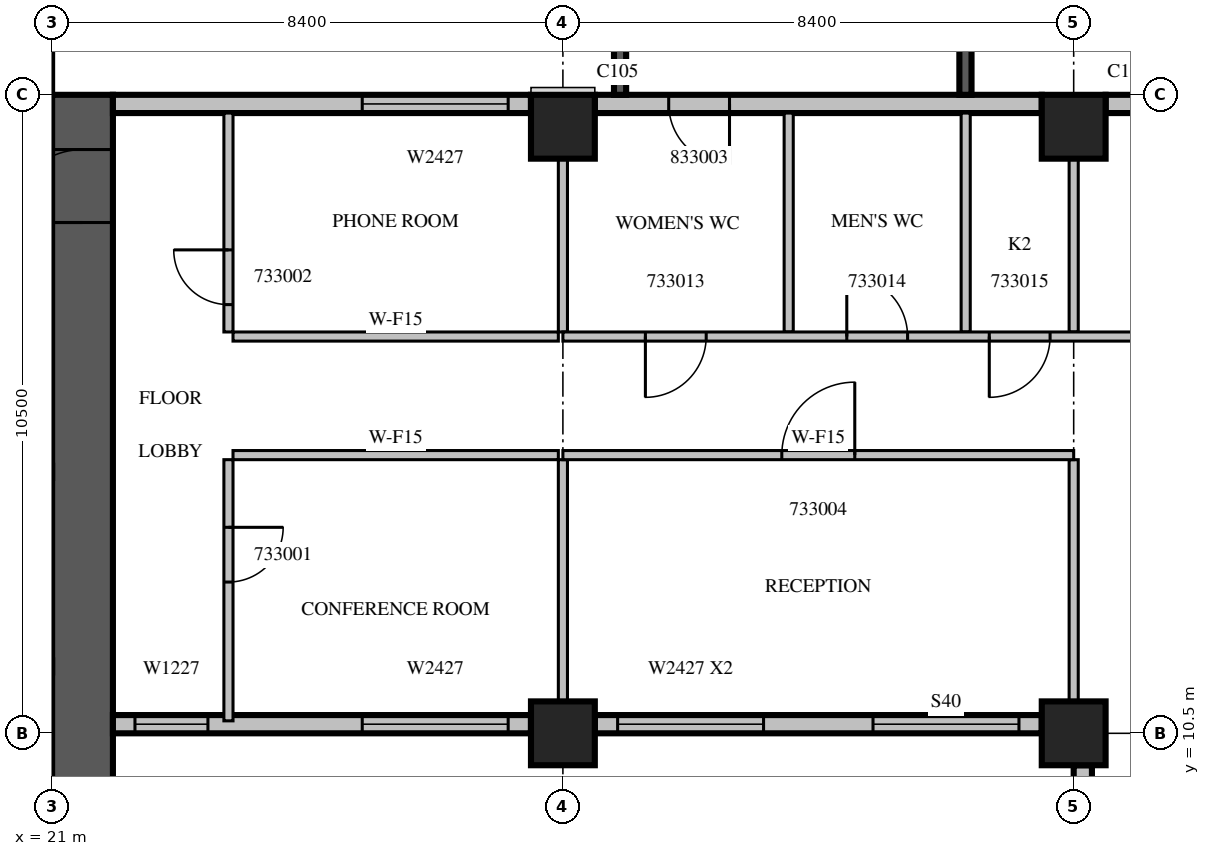
"""IFC4 building model, lengths in metres.
Left out: names, types, materials, properties, quantities, classifications, styles, units other than length and angle.
Written with IfcOpenShell. Run it as: python <this file> out.ifc"""

import sys

from ifc_helpers import new_model, si_unit, direction, frame, frame_2d, origin, origin_2d, place, context, subcontext, project, spatial, rectangle, extrude, source, transform, mapped, element, fill, save


model = new_model("IFC4")
c1 = context("Model", 3, precision=1e-05, world=origin(), true_north=direction((0.0, 1.0)))
c2 = subcontext(c1, "Body", "Model", "MODEL_VIEW")
j1 = project(units=[si_unit("LENGTHUNIT", "METRE"), si_unit("PLANEANGLEUNIT", "RADIAN")], contexts=[c1])
p1 = place(None, origin())
s1 = spatial("IfcSite", under=j1, at=p1, CompositionType="ELEMENT")
p2 = place(p1, origin())
s2 = spatial("IfcBuilding", under=s1, at=p2, CompositionType="ELEMENT")
p3 = place(p2, frame((0.0, 0.0, 149.7)))
s3 = spatial("IfcBuildingStorey", under=s2, at=p3, CompositionType="ELEMENT", Elevation=149.7)
m1 = source(origin(), c2, "Body", "SweptSolid", [
    extrude(rectangle(XDim=1.05, YDim=1.05, at=origin_2d()), origin(), (0.0, 0.0, 1.0), 4.2),
])
for number, where, z_axis, x_axis in (
    (1, (29.4, 10.5, 0.0), (0.0, 0.0, 1.0), (1.0, 0.0, 0.0)),
    (2, (37.8, 10.5, 0.0), (0.0, 0.0, 1.0), (1.0, 0.0, 0.0)),
    (3, (29.4, 20.475, 0.0), (0.0, 0.0, 1.0), (1.0, 0.0, 0.0)),
    (4, (37.8, 20.475, 0.0), (0.0, 0.0, 1.0), (1.0, 0.0, 0.0)),
):
    element("IfcColumn", number, at=place(p3, frame(where, z_axis=z_axis, x_axis=x_axis)), inside=s3, PredefinedType="COLUMN", context=c2, shape_type="MappedRepresentation", body=[
        mapped(m1, transform((0.0, 0.0, 0.0), scale=1.0)),
    ])
m2 = source(origin(), c2, "Body", "SweptSolid", [
    extrude(rectangle(XDim=16.8, YDim=1.0, at=frame_2d((8.4, 0.0))), origin(), (0.0, 0.0, 1.0), 4.2),
])
p4 = place(p3, frame((21.5, 4.2, 0.0), z_axis=(0.0, 0.0, 1.0), x_axis=(0.0, 1.0, 0.0)))
e5 = element("IfcWall", 5, at=p4, inside=s3, PredefinedType="SHEAR", context=c2, shape_type="MappedRepresentation", body=[
    mapped(m2, transform((0.0, 0.0, 0.0), scale=1.0)),
])
m3 = source(origin(), c2, "Body", "SweptSolid", [
    extrude(rectangle(XDim=1.2, YDim=2.1, at=frame_2d((0.6, 1.05))), frame((0.0, 0.51, 0.0), z_axis=(0.0, -1.0, 0.0), x_axis=(1.0, 0.0, 0.0)), (0.0, 0.0, 1.0), 1.02),
])
p5 = place(p4, frame((14.7, 0.0, 0.0)))
e6 = element("IfcOpeningElement", 6, at=p5, cuts=e5, PredefinedType="OPENING", context=c2, shape_type="MappedRepresentation", body=[
    mapped(m3, transform((0.0, 0.0, 0.0), scale=1.0)),
])
m4 = source(origin(), c2, "Body", "SweptSolid", [
    extrude(rectangle(XDim=6.875, YDim=0.3, at=frame_2d((3.438, 0.0))), origin(), (0.0, 0.0, 1.0), 3.8),
])
p6 = place(p3, frame((22.0, 10.65, 0.0), z_axis=(0.0, 0.0, 1.0), x_axis=(1.0, 0.0, 0.0)))
e7 = element("IfcWall", 7, at=p6, inside=s3, PredefinedType="STANDARD", context=c2, shape_type="MappedRepresentation", body=[
    mapped(m4, transform((0.0, 0.0, 0.0), scale=1.0)),
])
m5 = source(origin(), c2, "Body", "SweptSolid", [
    extrude(rectangle(XDim=1.2, YDim=2.7, at=frame_2d((0.6, 1.35))), frame((0.0, 0.16, 0.0), z_axis=(0.0, -1.0, 0.0), x_axis=(1.0, 0.0, 0.0)), (0.0, 0.0, 1.0), 0.32),
])
p7 = place(p6, frame((0.362, 0.0, 0.6)))
e8 = element("IfcOpeningElement", 8, at=p7, cuts=e7, PredefinedType="OPENING", context=c2, shape_type="MappedRepresentation", body=[
    mapped(m5, transform((0.0, 0.0, 0.0), scale=1.0)),
])
m6 = source(origin(), c2, "Body", "SweptSolid", [
    extrude(rectangle(XDim=2.4, YDim=2.7, at=frame_2d((1.2, 1.35))), frame((0.0, 0.16, 0.0), z_axis=(0.0, -1.0, 0.0), x_axis=(1.0, 0.0, 0.0)), (0.0, 0.0, 1.0), 0.32),
])
p8 = place(p6, frame((4.1, 0.0, 0.6)))
e9 = element("IfcOpeningElement", 9, at=p8, cuts=e7, PredefinedType="OPENING", context=c2, shape_type="MappedRepresentation", body=[
    mapped(m6, transform((0.0, 0.0, 0.0), scale=1.0)),
])
m7 = source(origin(), c2, "Body", "SweptSolid", [
    extrude(rectangle(XDim=7.35, YDim=0.3, at=frame_2d((3.675, 0.0))), origin(), (0.0, 0.0, 1.0), 3.8),
])
p9 = place(p3, frame((29.925, 10.65, 0.0), z_axis=(0.0, 0.0, 1.0), x_axis=(1.0, 0.0, 0.0)))
e10 = element("IfcWall", 10, at=p9, inside=s3, PredefinedType="STANDARD", context=c2, shape_type="MappedRepresentation", body=[
    mapped(m7, transform((0.0, 0.0, 0.0), scale=1.0)),
])
p10 = place(p9, frame((0.375, 0.0, 0.6)))
e11 = element("IfcOpeningElement", 11, at=p10, cuts=e10, PredefinedType="OPENING", context=c2, shape_type="MappedRepresentation", body=[
    mapped(m6, transform((0.0, 0.0, 0.0), scale=1.0)),
])
p11 = place(p9, frame((4.575, 0.0, 0.6)))
e12 = element("IfcOpeningElement", 12, at=p11, cuts=e10, PredefinedType="OPENING", context=c2, shape_type="MappedRepresentation", body=[
    mapped(m6, transform((0.0, 0.0, 0.0), scale=1.0)),
])
m8 = source(origin(), c2, "Body", "SweptSolid", [
    extrude(rectangle(XDim=8.925, YDim=0.3, at=frame_2d((4.463, 0.0))), origin(), (0.0, 0.0, 1.0), 3.8),
])
p12 = place(p3, frame((37.95, 9.975, 0.0), z_axis=(0.0, 0.0, 1.0), x_axis=(0.0, -1.0, 0.0)))
e13 = element("IfcWall", 13, at=p12, inside=s3, PredefinedType="STANDARD", context=c2, shape_type="MappedRepresentation", body=[
    mapped(m8, transform((0.0, 0.0, 0.0), scale=1.0)),
])
m9 = source(origin(), c2, "Body", "SweptSolid", [
    extrude(rectangle(XDim=1.8, YDim=2.7, at=frame_2d((0.9, 1.35))), frame((0.0, 0.16, 0.0), z_axis=(0.0, -1.0, 0.0), x_axis=(1.0, 0.0, 0.0)), (0.0, 0.0, 1.0), 0.32),
])
p13 = place(p12, frame((1.887, 0.0, 0.6)))
e14 = element("IfcOpeningElement", 14, at=p13, cuts=e13, PredefinedType="OPENING", context=c2, shape_type="MappedRepresentation", body=[
    mapped(m9, transform((0.0, 0.0, 0.0), scale=1.0)),
])
p14 = place(p12, frame((6.15, 0.0, 0.6)))
e15 = element("IfcOpeningElement", 15, at=p14, cuts=e13, PredefinedType="OPENING", context=c2, shape_type="MappedRepresentation", body=[
    mapped(m6, transform((0.0, 0.0, 0.0), scale=1.0)),
])
p15 = place(p3, frame((45.675, 20.85, 0.0), z_axis=(0.0, 0.0, 1.0), x_axis=(-1.0, 0.0, 0.0)))
e16 = element("IfcWall", 16, at=p15, inside=s3, PredefinedType="STANDARD", context=c2, shape_type="MappedRepresentation", body=[
    mapped(m7, transform((0.0, 0.0, 0.0), scale=1.0)),
])
m10 = source(origin(), c2, "Body", "SweptSolid", [
    extrude(rectangle(XDim=1.0, YDim=2.1, at=frame_2d((0.5, 1.05))), frame((0.0, 0.16, 0.0), z_axis=(0.0, -1.0, 0.0), x_axis=(1.0, 0.0, 0.0)), (0.0, 0.0, 1.0), 0.32),
])
p16 = place(p15, frame((1.075, 0.0, 0.0)))
e17 = element("IfcOpeningElement", 17, at=p16, cuts=e16, PredefinedType="OPENING", context=c2, shape_type="MappedRepresentation", body=[
    mapped(m10, transform((0.0, 0.0, 0.0), scale=1.0)),
])
p17 = place(p3, frame((37.275, 20.85, 0.0), z_axis=(0.0, 0.0, 1.0), x_axis=(-1.0, 0.0, 0.0)))
e18 = element("IfcWall", 18, at=p17, inside=s3, PredefinedType="STANDARD", context=c2, shape_type="MappedRepresentation", body=[
    mapped(m7, transform((0.0, 0.0, 0.0), scale=1.0)),
])
p18 = place(p17, frame((5.135, 0.0, 0.0)))
e19 = element("IfcOpeningElement", 19, at=p18, cuts=e18, PredefinedType="OPENING", context=c2, shape_type="MappedRepresentation", body=[
    mapped(m10, transform((0.0, 0.0, 0.0), scale=1.0)),
])
p19 = place(p3, frame((28.875, 20.85, 0.0), z_axis=(0.0, 0.0, 1.0), x_axis=(-1.0, 0.0, 0.0)))
e20 = element("IfcWall", 20, at=p19, inside=s3, PredefinedType="STANDARD", context=c2, shape_type="MappedRepresentation", body=[
    mapped(m4, transform((0.0, 0.0, 0.0), scale=1.0)),
])
p20 = place(p19, frame((0.375, 0.0, 0.6)))
e21 = element("IfcOpeningElement", 21, at=p20, cuts=e20, PredefinedType="OPENING", context=c2, shape_type="MappedRepresentation", body=[
    mapped(m6, transform((0.0, 0.0, 0.0), scale=1.0)),
])
m11 = source(origin(), c2, "Body", "SweptSolid", [
    extrude(rectangle(XDim=3.9, YDim=0.2, at=frame_2d((1.95, 0.0))), origin(), (0.0, 0.0, 1.0), 3.79),
])
p21 = place(p3, frame((36.02, 21.0, 0.0), z_axis=(0.0, 0.0, 1.0), x_axis=(0.0, 1.0, 0.0)))
e22 = element("IfcWall", 22, at=p21, inside=s3, PredefinedType="SOLIDWALL", context=c2, shape_type="MappedRepresentation", body=[
    mapped(m11, transform((0.0, 0.0, 0.0), scale=1.0)),
])
m12 = source(origin(), c2, "Body", "SweptSolid", [
    extrude(rectangle(XDim=2.4, YDim=2.7, at=frame_2d((1.2, 1.35))), frame((0.0, 0.11, 0.0), z_axis=(0.0, -1.0, 0.0), x_axis=(1.0, 0.0, 0.0)), (0.0, 0.0, 1.0), 0.22),
])
p22 = place(p21, frame((0.75, 0.0, 0.6)))
e23 = element("IfcOpeningElement", 23, at=p22, cuts=e22, PredefinedType="OPENING", context=c2, shape_type="MappedRepresentation", body=[
    mapped(m12, transform((0.0, 0.0, 0.0), scale=1.0)),
])
p23 = place(p3, frame((30.34, 21.0, 0.0), z_axis=(0.0, 0.0, 1.0), x_axis=(0.0, 1.0, 0.0)))
e24 = element("IfcWall", 24, at=p23, inside=s3, PredefinedType="SOLIDWALL", context=c2, shape_type="MappedRepresentation", body=[
    mapped(m11, transform((0.0, 0.0, 0.0), scale=1.0)),
])
p24 = place(p23, frame((0.75, 0.0, 0.6)))
e25 = element("IfcOpeningElement", 25, at=p24, cuts=e24, PredefinedType="OPENING", context=c2, shape_type="MappedRepresentation", body=[
    mapped(m12, transform((0.0, 0.0, 0.0), scale=1.0)),
])
m13 = source(origin(), c2, "Body", "SweptSolid", [
    extrude(rectangle(XDim=4.295, YDim=0.15, at=frame_2d((2.147, 0.0))), origin(), (0.0, 0.0, 1.0), 3.8),
])
p25 = place(p3, frame((23.9, 15.0, 0.0), z_axis=(0.0, 0.0, 1.0), x_axis=(0.0, -1.0, 0.0)))
e26 = element("IfcWall", 26, at=p25, inside=s3, PredefinedType="PARTITIONING", context=c2, shape_type="MappedRepresentation", body=[
    mapped(m13, transform((0.0, 0.0, 0.0), scale=1.0)),
])
m14 = source(origin(), c2, "Body", "SweptSolid", [
    extrude(rectangle(XDim=0.9, YDim=2.1, at=frame_2d((0.45, 1.05))), frame((0.0, 0.085, 0.0), z_axis=(0.0, -1.0, 0.0), x_axis=(1.0, 0.0, 0.0)), (0.0, 0.0, 1.0), 0.17),
])
p26 = place(p25, frame((1.113, 0.0, 0.0)))
e27 = element("IfcOpeningElement", 27, at=p26, cuts=e26, PredefinedType="OPENING", context=c2, shape_type="MappedRepresentation", body=[
    mapped(m14, transform((0.0, 0.0, 0.0), scale=1.0)),
])
m15 = source(origin(), c2, "Body", "SweptSolid", [
    extrude(rectangle(XDim=3.6, YDim=0.15, at=frame_2d((1.8, 0.0))), origin(), (0.0, 0.0, 1.0), 3.8),
])
p27 = place(p3, frame((23.9, 20.7, 0.0), z_axis=(0.0, 0.0, 1.0), x_axis=(0.0, -1.0, 0.0)))
e28 = element("IfcWall", 28, at=p27, inside=s3, PredefinedType="PARTITIONING", context=c2, shape_type="MappedRepresentation", body=[
    mapped(m15, transform((0.0, 0.0, 0.0), scale=1.0)),
])
p28 = place(p27, frame((2.25, 0.0, 0.0)))
e29 = element("IfcOpeningElement", 29, at=p28, cuts=e28, PredefinedType="OPENING", context=c2, shape_type="MappedRepresentation", body=[
    mapped(m14, transform((0.0, 0.0, 0.0), scale=1.0)),
])
m16 = source(origin(), c2, "Body", "SweptSolid", [
    extrude(rectangle(XDim=5.35, YDim=0.15, at=frame_2d((2.675, 0.0))), origin(), (0.0, 0.0, 1.0), 3.8),
])
for number, where, z_axis, x_axis in (
    (30, (29.325, 15.075, 0.0), (0.0, 0.0, 1.0), (-1.0, 0.0, 0.0)),
    (31, (23.975, 17.025, 0.0), (0.0, 0.0, 1.0), (1.0, 0.0, 0.0)),
):
    element("IfcWall", number, at=place(p3, frame(where, z_axis=z_axis, x_axis=x_axis)), inside=s3, PredefinedType="PARTITIONING", context=c2, shape_type="MappedRepresentation", body=[
        mapped(m16, transform((0.0, 0.0, 0.0), scale=1.0)),
    ])
m17 = source(origin(), c2, "Body", "SweptSolid", [
    extrude(rectangle(XDim=3.976, YDim=0.15, at=frame_2d((1.988, 0.0))), origin(), (0.0, 0.0, 1.0), 3.8),
])
p29 = place(p3, frame((29.4, 11.024, 0.0), z_axis=(0.0, 0.0, 1.0), x_axis=(0.0, 1.0, 0.0)))
e32 = element("IfcWall", 32, at=p29, inside=s3, PredefinedType="PARTITIONING", context=c2, shape_type="MappedRepresentation", body=[
    mapped(m17, transform((0.0, 0.0, 0.0), scale=1.0)),
])
m18 = source(origin(), c2, "Body", "SweptSolid", [
    extrude(rectangle(XDim=2.851, YDim=0.15, at=frame_2d((1.425, 0.0))), origin(), (0.0, 0.0, 1.0), 3.8),
])
p30 = place(p3, frame((29.4, 17.1, 0.0), z_axis=(0.0, 0.0, 1.0), x_axis=(0.0, 1.0, 0.0)))
e33 = element("IfcWall", 33, at=p30, inside=s3, PredefinedType="PARTITIONING", context=c2, shape_type="MappedRepresentation", body=[
    mapped(m18, transform((0.0, 0.0, 0.0), scale=1.0)),
])
p31 = place(p3, frame((37.8, 11.024, 0.0), z_axis=(0.0, 0.0, 1.0), x_axis=(0.0, 1.0, 0.0)))
e34 = element("IfcWall", 34, at=p31, inside=s3, PredefinedType="PARTITIONING", context=c2, shape_type="MappedRepresentation", body=[
    mapped(m17, transform((0.0, 0.0, 0.0), scale=1.0)),
])
for number, where, z_axis, x_axis in (
    (35, (33.113, 20.7, 0.0), (0.0, 0.0, 1.0), (0.0, -1.0, 0.0)),
    (36, (36.024, 20.7, 0.0), (0.0, 0.0, 1.0), (0.0, -1.0, 0.0)),
):
    element("IfcWall", number, at=place(p3, frame(where, z_axis=z_axis, x_axis=x_axis)), inside=s3, PredefinedType="PARTITIONING", context=c2, shape_type="MappedRepresentation", body=[
        mapped(m15, transform((0.0, 0.0, 0.0), scale=1.0)),
    ])
p32 = place(p3, frame((37.8, 17.1, 0.0), z_axis=(0.0, 0.0, 1.0), x_axis=(0.0, 1.0, 0.0)))
e37 = element("IfcWall", 37, at=p32, inside=s3, PredefinedType="PARTITIONING", context=c2, shape_type="MappedRepresentation", body=[
    mapped(m18, transform((0.0, 0.0, 0.0), scale=1.0)),
])
m19 = source(origin(), c2, "Body", "SweptSolid", [
    extrude(rectangle(XDim=8.4, YDim=0.15, at=frame_2d((4.2, 0.0))), origin(), (0.0, 0.0, 1.0), 3.8),
])
p33 = place(p3, frame((37.8, 15.075, 0.0), z_axis=(0.0, 0.0, 1.0), x_axis=(-1.0, 0.0, 0.0)))
e38 = element("IfcWall", 38, at=p33, inside=s3, PredefinedType="PARTITIONING", context=c2, shape_type="MappedRepresentation", body=[
    mapped(m19, transform((0.0, 0.0, 0.0), scale=1.0)),
])
m20 = source(origin(), c2, "Body", "SweptSolid", [
    extrude(rectangle(XDim=1.2, YDim=2.1, at=frame_2d((0.6, 1.05))), frame((0.0, 0.085, 0.0), z_axis=(0.0, -1.0, 0.0), x_axis=(1.0, 0.0, 0.0)), (0.0, 0.0, 1.0), 0.17),
])
p34 = place(p33, frame((3.6, 0.0, 0.0)))
e39 = element("IfcOpeningElement", 39, at=p34, cuts=e38, PredefinedType="OPENING", context=c2, shape_type="MappedRepresentation", body=[
    mapped(m20, transform((0.0, 0.0, 0.0), scale=1.0)),
])
m21 = source(origin(), c2, "Body", "SweptSolid", [
    extrude(rectangle(XDim=37.5, YDim=0.15, at=frame_2d((18.75, 0.0))), origin(), (0.0, 0.0, 1.0), 3.8),
])
p35 = place(p3, frame((29.4, 17.025, 0.0), z_axis=(0.0, 0.0, 1.0), x_axis=(1.0, 0.0, 0.0)))
e40 = element("IfcWall", 40, at=p35, inside=s3, PredefinedType="PARTITIONING", context=c2, shape_type="MappedRepresentation", body=[
    mapped(m21, transform((0.0, 0.0, 0.0), scale=1.0)),
])
m22 = source(origin(), c2, "Body", "SweptSolid", [
    extrude(rectangle(XDim=1.0, YDim=2.1, at=frame_2d((0.5, 1.05))), frame((0.0, 0.085, 0.0), z_axis=(0.0, -1.0, 0.0), x_axis=(1.0, 0.0, 0.0)), (0.0, 0.0, 1.0), 0.17),
])
p36 = place(p35, frame((1.357, 0.0, 0.0)))
e41 = element("IfcOpeningElement", 41, at=p36, cuts=e40, PredefinedType="OPENING", context=c2, shape_type="MappedRepresentation", body=[
    mapped(m22, transform((0.0, 0.0, 0.0), scale=1.0)),
])
p37 = place(p35, frame((4.669, 0.0, 0.0)))
e42 = element("IfcOpeningElement", 42, at=p37, cuts=e40, PredefinedType="OPENING", context=c2, shape_type="MappedRepresentation", body=[
    mapped(m22, transform((0.0, 0.0, 0.0), scale=1.0)),
])
p38 = place(p35, frame((7.012, 0.0, 0.0)))
e43 = element("IfcOpeningElement", 43, at=p38, cuts=e40, PredefinedType="OPENING", context=c2, shape_type="MappedRepresentation", body=[
    mapped(m22, transform((0.0, 0.0, 0.0), scale=1.0)),
])
p39 = place(p35, frame((10.05, 0.0, 0.0)))
e44 = element("IfcOpeningElement", 44, at=p39, cuts=e40, PredefinedType="OPENING", context=c2, shape_type="MappedRepresentation", body=[
    mapped(m14, transform((0.0, 0.0, 0.0), scale=1.0)),
])
p40 = place(p35, frame((14.62, 0.0, 0.0)))
e45 = element("IfcOpeningElement", 45, at=p40, cuts=e40, PredefinedType="OPENING", context=c2, shape_type="MappedRepresentation", body=[
    mapped(m22, transform((0.0, 0.0, 0.0), scale=1.0)),
])
p41 = place(p35, frame((19.66, 0.0, 0.0)))
e46 = element("IfcOpeningElement", 46, at=p41, cuts=e40, PredefinedType="OPENING", context=c2, shape_type="MappedRepresentation", body=[
    mapped(m22, transform((0.0, 0.0, 0.0), scale=1.0)),
])
p42 = place(p35, frame((25.804, 0.0, 0.0)))
e47 = element("IfcOpeningElement", 47, at=p42, cuts=e40, PredefinedType="OPENING", context=c2, shape_type="MappedRepresentation", body=[
    mapped(m20, transform((0.0, 0.0, 0.0), scale=1.0)),
])
p43 = place(p35, frame((33.251, 0.0, 0.0)))
e48 = element("IfcOpeningElement", 48, at=p43, cuts=e40, PredefinedType="OPENING", context=c2, shape_type="MappedRepresentation", body=[
    mapped(m20, transform((0.0, 0.0, 0.0), scale=1.0)),
])
m23 = source(origin(), c2, "Body", "SweptSolid", [
    extrude(rectangle(XDim=1.2, YDim=2.7, at=frame_2d((0.6, 1.35))), frame((0.0, 0.03, 0.0), z_axis=(0.0, -1.0, 0.0), x_axis=(1.0, 0.0, 0.0)), (0.0, 0.0, 1.0), 0.06),
])
p44 = place(p7, origin())
e49 = element("IfcWindow", 49, at=p44, inside=s3, PartitioningType="SINGLE_PANEL", PredefinedType="WINDOW", context=c2, shape_type="MappedRepresentation", body=[
    mapped(m23, transform((0.0, 0.0, 0.0), scale=1.0)),
])
fill(e8, e49)
m24 = source(origin(), c2, "Body", "SweptSolid", [
    extrude(rectangle(XDim=2.4, YDim=2.7, at=frame_2d((1.2, 1.35))), frame((0.0, 0.03, 0.0), z_axis=(0.0, -1.0, 0.0), x_axis=(1.0, 0.0, 0.0)), (0.0, 0.0, 1.0), 0.06),
])
p45 = place(p8, origin())
e50 = element("IfcWindow", 50, at=p45, inside=s3, PartitioningType="SINGLE_PANEL", PredefinedType="WINDOW", context=c2, shape_type="MappedRepresentation", body=[
    mapped(m24, transform((0.0, 0.0, 0.0), scale=1.0)),
])
fill(e9, e50)
p46 = place(p10, origin())
e51 = element("IfcWindow", 51, at=p46, inside=s3, PartitioningType="SINGLE_PANEL", PredefinedType="WINDOW", context=c2, shape_type="MappedRepresentation", body=[
    mapped(m24, transform((0.0, 0.0, 0.0), scale=1.0)),
])
fill(e11, e51)
p47 = place(p11, origin())
e52 = element("IfcWindow", 52, at=p47, inside=s3, PartitioningType="SINGLE_PANEL", PredefinedType="WINDOW", context=c2, shape_type="MappedRepresentation", body=[
    mapped(m24, transform((0.0, 0.0, 0.0), scale=1.0)),
])
fill(e12, e52)
p48 = place(p20, origin())
e53 = element("IfcWindow", 53, at=p48, inside=s3, PartitioningType="SINGLE_PANEL", PredefinedType="WINDOW", context=c2, shape_type="MappedRepresentation", body=[
    mapped(m24, transform((0.0, 0.0, 0.0), scale=1.0)),
])
fill(e21, e53)
m25 = source(origin(), c2, "Body", "SweptSolid", [
    extrude(rectangle(XDim=1.2, YDim=2.1, at=frame_2d((0.6, 1.05))), frame((0.0, 0.025, 0.0), z_axis=(0.0, -1.0, 0.0), x_axis=(1.0, 0.0, 0.0)), (0.0, 0.0, 1.0), 0.05),
])
p49 = place(p5, origin())
e54 = element("IfcDoor", 54, at=p49, inside=s3, OperationType="SINGLE_SWING_LEFT", PredefinedType="DOOR", context=c2, shape_type="MappedRepresentation", body=[
    mapped(m25, transform((0.0, 0.0, 0.0), scale=1.0)),
])
fill(e6, e54)
m26 = source(origin(), c2, "Body", "SweptSolid", [
    extrude(rectangle(XDim=0.9, YDim=2.1, at=frame_2d((0.45, 1.05))), frame((0.0, 0.025, 0.0), z_axis=(0.0, -1.0, 0.0), x_axis=(1.0, 0.0, 0.0)), (0.0, 0.0, 1.0), 0.05),
])
p50 = place(p26, origin())
e55 = element("IfcDoor", 55, at=p50, inside=s3, OperationType="SINGLE_SWING_LEFT", PredefinedType="DOOR", context=c2, shape_type="MappedRepresentation", body=[
    mapped(m26, transform((0.0, 0.0, 0.0), scale=1.0)),
])
fill(e27, e55)
p51 = place(p28, origin())
e56 = element("IfcDoor", 56, at=p51, inside=s3, OperationType="SINGLE_SWING_RIGHT", PredefinedType="DOOR", context=c2, shape_type="MappedRepresentation", body=[
    mapped(m26, transform((0.0, 0.0, 0.0), scale=1.0)),
])
fill(e29, e56)
p52 = place(p34, origin())
e57 = element("IfcDoor", 57, at=p52, inside=s3, OperationType="SINGLE_SWING_RIGHT", PredefinedType="DOOR", context=c2, shape_type="MappedRepresentation", body=[
    mapped(m25, transform((0.0, 0.0, 0.0), scale=1.0)),
])
fill(e39, e57)
m27 = source(origin(), c2, "Body", "SweptSolid", [
    extrude(rectangle(XDim=1.0, YDim=2.1, at=frame_2d((0.5, 1.05))), frame((0.0, 0.025, 0.0), z_axis=(0.0, -1.0, 0.0), x_axis=(1.0, 0.0, 0.0)), (0.0, 0.0, 1.0), 0.05),
])
p53 = place(p36, origin())
e58 = element("IfcDoor", 58, at=p53, inside=s3, OperationType="SINGLE_SWING_RIGHT", PredefinedType="DOOR", context=c2, shape_type="MappedRepresentation", body=[
    mapped(m27, transform((0.0, 0.0, 0.0), scale=1.0)),
])
fill(e41, e58)
p54 = place(p37, origin())
e59 = element("IfcDoor", 59, at=p54, inside=s3, OperationType="SINGLE_SWING_LEFT", PredefinedType="DOOR", context=c2, shape_type="MappedRepresentation", body=[
    mapped(m27, transform((0.0, 0.0, 0.0), scale=1.0)),
])
fill(e42, e59)
p55 = place(p38, origin())
e60 = element("IfcDoor", 60, at=p55, inside=s3, OperationType="SINGLE_SWING_RIGHT", PredefinedType="DOOR", context=c2, shape_type="MappedRepresentation", body=[
    mapped(m27, transform((0.0, 0.0, 0.0), scale=1.0)),
])
fill(e43, e60)
p56 = place(p18, origin())
e61 = element("IfcDoor", 61, at=p56, inside=s3, OperationType="SINGLE_SWING_LEFT", PredefinedType="DOOR", context=c2, shape_type="MappedRepresentation", body=[
    mapped(m27, transform((0.0, 0.0, 0.0), scale=1.0)),
])
fill(e19, e61)
save(model, sys.argv[1])
